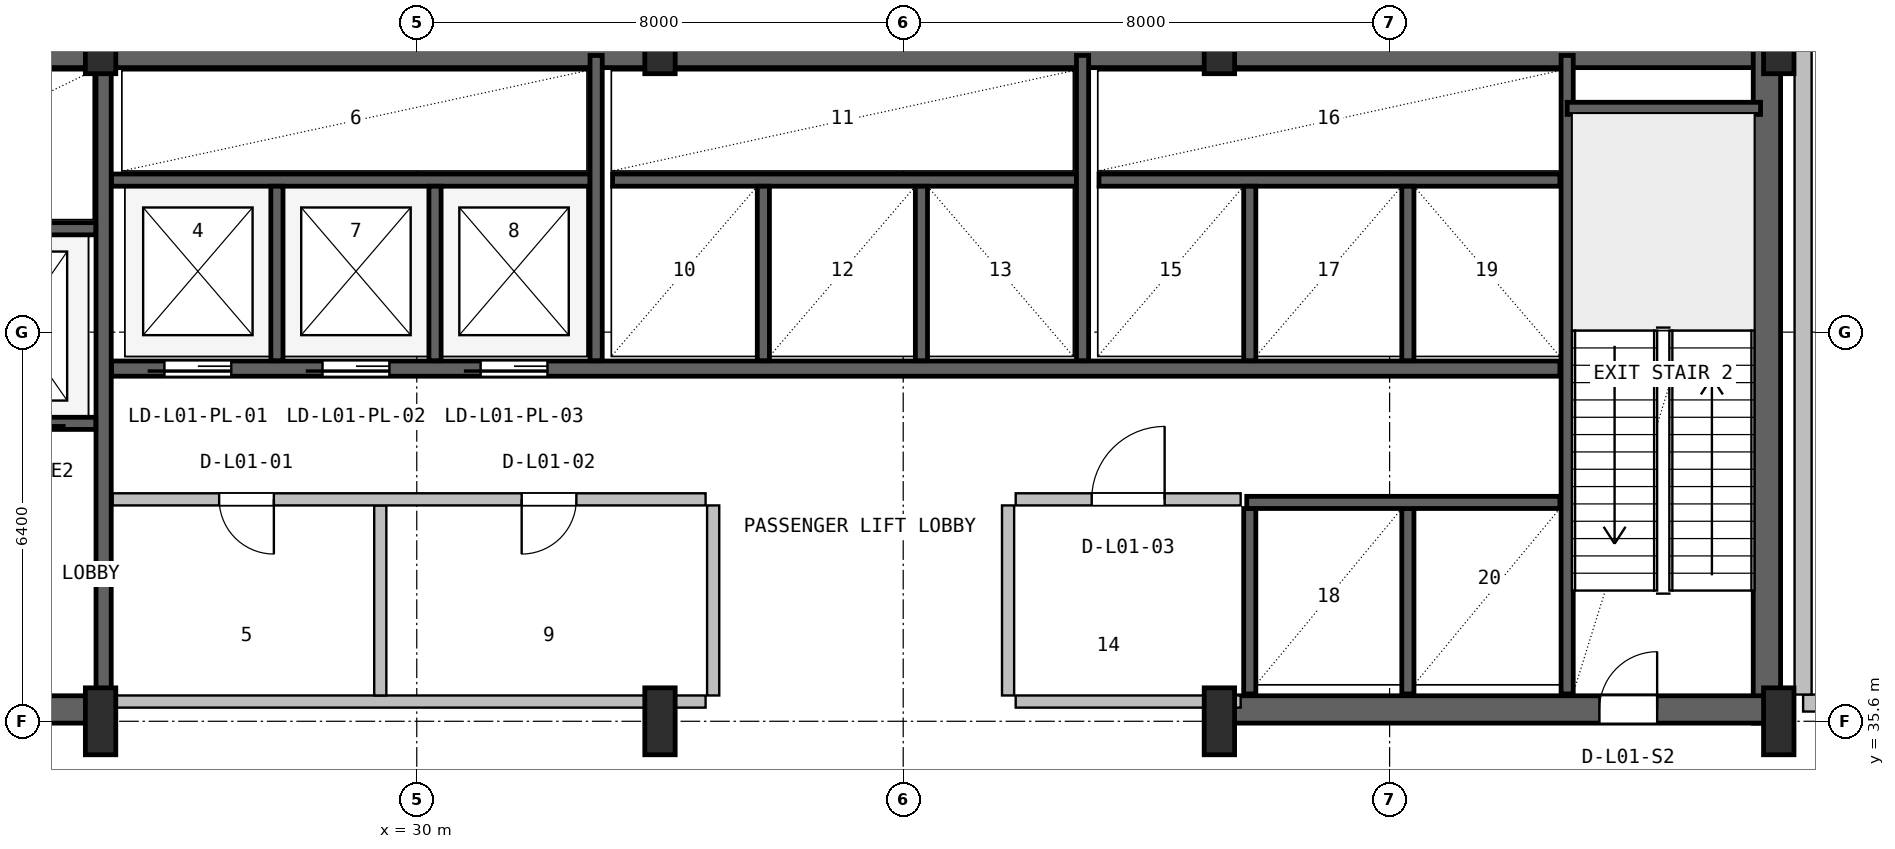
"""IFC4 building model, lengths in metres.
Left out: names, types, materials, properties, quantities, classifications, styles, units other than length and angle.
Written with IfcOpenShell. Run it as: python <this file> out.ifc"""

import sys

from ifc_helpers import new_model, si_unit, direction, frame, frame_2d, origin, origin_2d, place, context, subcontext, project, spatial, rectangle, i_section, extrude, source, transform, mapped, element, fill, save


model = new_model("IFC4")
c1 = context("Model", 3, precision=1e-05, world=origin(), true_north=direction((0.0, 1.0)))
c2 = subcontext(c1, "Body", "Model", "MODEL_VIEW")
j1 = project(units=[si_unit("LENGTHUNIT", "METRE"), si_unit("PLANEANGLEUNIT", "RADIAN")], contexts=[c1])
p1 = place(None, origin())
s1 = spatial("IfcSite", under=j1, at=p1, CompositionType="ELEMENT")
p2 = place(p1, origin())
s2 = spatial("IfcBuilding", under=s1, at=p2, CompositionType="ELEMENT")
p3 = place(p2, frame((0.0, 0.0, 6.0)))
s3 = spatial("IfcBuildingStorey", under=s2, at=p3, CompositionType="ELEMENT", Elevation=6.0)
p4 = place(p3, frame((15.6, 46.575, 0.0), z_axis=(0.0, 0.0, 1.0), x_axis=(1.0, 0.0, 0.0)))
e1 = element("IfcWall", 1, at=p4, inside=s3, PredefinedType="SHEAR", context=c2, shape_type="SweptSolid", body=[
    extrude(rectangle(XDim=36.8, YDim=0.45, at=frame_2d((18.4, 0.0))), origin(), (0.0, 0.0, 1.0), 5.12),
])
p5 = place(p3, frame((52.205, 35.57, 0.0), z_axis=(0.0, 0.0, 1.0), x_axis=(0.0, 1.0, 0.0)))
e2 = element("IfcWall", 2, at=p5, inside=s3, PredefinedType="SHEAR", context=c2, shape_type="SweptSolid", body=[
    extrude(rectangle(XDim=11.23, YDim=0.45, at=frame_2d((5.615, 0.0))), origin(), (0.0, 0.0, 1.0), 5.12),
])
p6 = place(p3, frame((15.57, 35.795, 0.0), z_axis=(0.0, 0.0, 1.0), x_axis=(1.0, 0.0, 0.0)))
e3 = element("IfcWall", 3, at=p6, inside=s3, PredefinedType="SHEAR", context=c2, shape_type="SweptSolid", body=[
    extrude(rectangle(XDim=9.23, YDim=0.45, at=frame_2d((4.615, 0.0))), origin(), (0.0, 0.0, 1.0), 5.12),
])
p7 = place(p6, frame((5.4, 0.0, 0.0)))
e4 = element("IfcOpeningElement", 4, at=p7, cuts=e3, PredefinedType="OPENING", context=c2, shape_type="SweptSolid", body=[
    extrude(rectangle(XDim=1.0, YDim=2.1, at=frame_2d((0.5, 1.05))), frame((0.0, 0.235, 0.0), z_axis=(0.0, -1.0, 0.0), x_axis=(1.0, 0.0, 0.0)), (0.0, 0.0, 1.0), 0.47),
])
p8 = place(p3, frame((43.2, 35.795, 0.0), z_axis=(0.0, 0.0, 1.0), x_axis=(1.0, 0.0, 0.0)))
e5 = element("IfcWall", 5, at=p8, inside=s3, PredefinedType="SHEAR", context=c2, shape_type="SweptSolid", body=[
    extrude(rectangle(XDim=9.23, YDim=0.45, at=frame_2d((4.615, 0.0))), origin(), (0.0, 0.0, 1.0), 5.12),
])
p9 = place(p8, frame((6.25, 0.0, 0.0)))
e6 = element("IfcOpeningElement", 6, at=p9, cuts=e5, PredefinedType="OPENING", context=c2, shape_type="SweptSolid", body=[
    extrude(rectangle(XDim=0.95, YDim=2.1, at=frame_2d((0.475, 1.05))), frame((0.0, 0.235, 0.0), z_axis=(0.0, -1.0, 0.0), x_axis=(1.0, 0.0, 0.0)), (0.0, 0.0, 1.0), 0.47),
])
m1 = source(origin(), c2, "Body", "SweptSolid", [
    extrude(i_section(OverallWidth=0.5, OverallDepth=1.1, WebThickness=0.018, FlangeThickness=0.032, FilletRadius=0.018, at=origin_2d()), origin(), (0.0, 0.0, 1.0), 5.4),
])
for number, where, z_axis, x_axis in (
    (7, (24.8, 35.6, 0.0), (0.0, 0.0, 1.0), (1.0, 0.0, 0.0)),
    (8, (24.8, 46.8, 0.0), (0.0, 0.0, 1.0), (1.0, 0.0, 0.0)),
    (9, (34.0, 35.6, 0.0), (0.0, 0.0, 1.0), (1.0, 0.0, 0.0)),
    (10, (34.0, 46.8, 0.0), (0.0, 0.0, 1.0), (1.0, 0.0, 0.0)),
    (11, (43.2, 35.6, 0.0), (0.0, 0.0, 1.0), (1.0, 0.0, 0.0)),
    (12, (43.2, 46.8, 0.0), (0.0, 0.0, 1.0), (1.0, 0.0, 0.0)),
    (13, (52.4, 35.6, 0.0), (0.0, 0.0, 1.0), (1.0, 0.0, 0.0)),
    (14, (52.4, 46.8, 0.0), (0.0, 0.0, 1.0), (1.0, 0.0, 0.0)),
):
    element("IfcColumn", number, at=place(p3, frame(where, z_axis=z_axis, x_axis=x_axis)), inside=s3, PredefinedType="COLUMN", context=c2, shape_type="MappedRepresentation", body=[
        mapped(m1, transform((0.0, 0.0, 0.0), x_axis=(1.0, 0.0, 0.0), y_axis=(0.0, 1.0, 0.0), z_axis=(0.0, 0.0, 1.0), scale=1.0)),
    ])
p10 = place(p3, frame((24.85, 36.05, 0.0), z_axis=(0.0, 0.0, 1.0), x_axis=(0.0, 1.0, 0.0)))
e15 = element("IfcWall", 15, at=p10, inside=s3, PredefinedType="SHEAR", context=c2, shape_type="SweptSolid", body=[
    extrude(rectangle(XDim=10.45, YDim=0.25, at=frame_2d((5.225, 0.0))), origin(), (0.0, 0.0, 1.0), 5.12),
])
p11 = place(p3, frame((19.2, 40.5, 0.0), z_axis=(0.0, 0.0, 1.0), x_axis=(1.0, 0.0, 0.0)))
e16 = element("IfcWall", 16, at=p11, inside=s3, PredefinedType="SHEAR", context=c2, shape_type="SweptSolid", body=[
    extrude(rectangle(XDim=5.52, YDim=0.2, at=frame_2d((2.76, 0.0))), origin(), (0.0, 0.0, 1.0), 5.12),
])
p12 = place(p11, frame((1.05, 0.0, 0.0)))
e17 = element("IfcOpeningElement", 17, at=p12, cuts=e16, PredefinedType="OPENING", context=c2, shape_type="SweptSolid", body=[
    extrude(rectangle(XDim=1.1, YDim=2.18, at=frame_2d((0.55, 1.09))), frame((0.0, 0.11, 0.0), z_axis=(0.0, -1.0, 0.0), x_axis=(1.0, 0.0, 0.0)), (0.0, 0.0, 1.0), 0.22),
])
p13 = place(p11, frame((3.65, 0.0, 0.0)))
e18 = element("IfcOpeningElement", 18, at=p13, cuts=e16, PredefinedType="OPENING", context=c2, shape_type="SweptSolid", body=[
    extrude(rectangle(XDim=1.1, YDim=2.18, at=frame_2d((0.55, 1.09))), frame((0.0, 0.11, 0.0), z_axis=(0.0, -1.0, 0.0), x_axis=(1.0, 0.0, 0.0)), (0.0, 0.0, 1.0), 0.22),
])
p14 = place(p3, frame((19.2, 43.7, 0.0), z_axis=(0.0, 0.0, 1.0), x_axis=(1.0, 0.0, 0.0)))
e19 = element("IfcWall", 19, at=p14, inside=s3, PredefinedType="SHEAR", context=c2, shape_type="SweptSolid", body=[
    extrude(rectangle(XDim=5.52, YDim=0.2, at=frame_2d((2.76, 0.0))), origin(), (0.0, 0.0, 1.0), 5.12),
])
p15 = place(p3, frame((48.92, 36.05, 0.0), z_axis=(0.0, 0.0, 1.0), x_axis=(0.0, 1.0, 0.0)))
e20 = element("IfcWall", 20, at=p15, inside=s3, PredefinedType="SHEAR", context=c2, shape_type="SweptSolid", body=[
    extrude(rectangle(XDim=10.5, YDim=0.2, at=frame_2d((5.25, 0.0))), origin(), (0.0, 0.0, 1.0), 5.12),
])
p16 = place(p3, frame((48.92, 45.68, 0.0), z_axis=(0.0, 0.0, 1.0), x_axis=(1.0, 0.0, 0.0)))
e21 = element("IfcWall", 21, at=p16, inside=s3, PredefinedType="SHEAR", context=c2, shape_type="SweptSolid", body=[
    extrude(rectangle(XDim=3.18, YDim=0.2, at=frame_2d((1.59, 0.0))), origin(), (0.0, 0.0, 1.0), 5.12),
])
p17 = place(p3, frame((24.98, 41.4, 0.0), z_axis=(0.0, 0.0, 1.0), x_axis=(1.0, 0.0, 0.0)))
e22 = element("IfcWall", 22, at=p17, inside=s3, PredefinedType="SHEAR", context=c2, shape_type="SweptSolid", body=[
    extrude(rectangle(XDim=23.82, YDim=0.25, at=frame_2d((11.91, 0.0))), origin(), (0.0, 0.0, 1.0), 5.12),
])
p18 = place(p17, frame((0.87, 0.0, 0.0)))
e23 = element("IfcOpeningElement", 23, at=p18, cuts=e22, PredefinedType="OPENING", context=c2, shape_type="SweptSolid", body=[
    extrude(rectangle(XDim=1.1, YDim=2.18, at=frame_2d((0.55, 1.09))), frame((0.0, 0.135, 0.0), z_axis=(0.0, -1.0, 0.0), x_axis=(1.0, 0.0, 0.0)), (0.0, 0.0, 1.0), 0.27),
])
p19 = place(p17, frame((3.47, 0.0, 0.0)))
e24 = element("IfcOpeningElement", 24, at=p19, cuts=e22, PredefinedType="OPENING", context=c2, shape_type="SweptSolid", body=[
    extrude(rectangle(XDim=1.1, YDim=2.18, at=frame_2d((0.55, 1.09))), frame((0.0, 0.135, 0.0), z_axis=(0.0, -1.0, 0.0), x_axis=(1.0, 0.0, 0.0)), (0.0, 0.0, 1.0), 0.27),
])
p20 = place(p17, frame((6.07, 0.0, 0.0)))
e25 = element("IfcOpeningElement", 25, at=p20, cuts=e22, PredefinedType="OPENING", context=c2, shape_type="SweptSolid", body=[
    extrude(rectangle(XDim=1.1, YDim=2.18, at=frame_2d((0.55, 1.09))), frame((0.0, 0.135, 0.0), z_axis=(0.0, -1.0, 0.0), x_axis=(1.0, 0.0, 0.0)), (0.0, 0.0, 1.0), 0.27),
])
p21 = place(p3, frame((24.98, 44.5, 0.0), z_axis=(0.0, 0.0, 1.0), x_axis=(1.0, 0.0, 0.0)))
e26 = element("IfcWall", 26, at=p21, inside=s3, PredefinedType="SHEAR", context=c2, shape_type="SweptSolid", body=[
    extrude(rectangle(XDim=7.87, YDim=0.2, at=frame_2d((3.935, 0.0))), origin(), (0.0, 0.0, 1.0), 5.12),
])
for number, where, z_axis, x_axis in (
    (27, (27.7, 41.53, 0.0), (0.0, 0.0, 1.0), (0.0, 1.0, 0.0)),
    (28, (30.3, 41.53, 0.0), (0.0, 0.0, 1.0), (0.0, 1.0, 0.0)),
):
    element("IfcWall", number, at=place(p3, frame(where, z_axis=z_axis, x_axis=x_axis)), inside=s3, PredefinedType="SHEAR", context=c2, shape_type="SweptSolid", body=[
        extrude(rectangle(XDim=2.87, YDim=0.2, at=frame_2d((1.435, 0.0))), origin(), (0.0, 0.0, 1.0), 5.12),
    ])
p22 = place(p3, frame((32.95, 41.53, 0.0), z_axis=(0.0, 0.0, 1.0), x_axis=(0.0, 1.0, 0.0)))
e29 = element("IfcWall", 29, at=p22, inside=s3, PredefinedType="SHEAR", context=c2, shape_type="SweptSolid", body=[
    extrude(rectangle(XDim=5.02, YDim=0.2, at=frame_2d((2.51, 0.0))), origin(), (0.0, 0.0, 1.0), 5.12),
])
p23 = place(p3, frame((33.22, 44.5, 0.0), z_axis=(0.0, 0.0, 1.0), x_axis=(1.0, 0.0, 0.0)))
e30 = element("IfcWall", 30, at=p23, inside=s3, PredefinedType="SHEAR", context=c2, shape_type="SweptSolid", body=[
    extrude(rectangle(XDim=7.63, YDim=0.2, at=frame_2d((3.815, 0.0))), origin(), (0.0, 0.0, 1.0), 5.12),
])
for number, where, z_axis, x_axis in (
    (31, (35.7, 41.53, 0.0), (0.0, 0.0, 1.0), (0.0, 1.0, 0.0)),
    (32, (38.3, 41.53, 0.0), (0.0, 0.0, 1.0), (0.0, 1.0, 0.0)),
):
    element("IfcWall", number, at=place(p3, frame(where, z_axis=z_axis, x_axis=x_axis)), inside=s3, PredefinedType="SHEAR", context=c2, shape_type="SweptSolid", body=[
        extrude(rectangle(XDim=2.87, YDim=0.2, at=frame_2d((1.435, 0.0))), origin(), (0.0, 0.0, 1.0), 5.12),
    ])
p24 = place(p3, frame((40.95, 41.53, 0.0), z_axis=(0.0, 0.0, 1.0), x_axis=(0.0, 1.0, 0.0)))
e33 = element("IfcWall", 33, at=p24, inside=s3, PredefinedType="SHEAR", context=c2, shape_type="SweptSolid", body=[
    extrude(rectangle(XDim=5.02, YDim=0.2, at=frame_2d((2.51, 0.0))), origin(), (0.0, 0.0, 1.0), 5.12),
])
p25 = place(p3, frame((41.22, 44.5, 0.0), z_axis=(0.0, 0.0, 1.0), x_axis=(1.0, 0.0, 0.0)))
e34 = element("IfcWall", 34, at=p25, inside=s3, PredefinedType="SHEAR", context=c2, shape_type="SweptSolid", body=[
    extrude(rectangle(XDim=7.58, YDim=0.2, at=frame_2d((3.79, 0.0))), origin(), (0.0, 0.0, 1.0), 5.12),
])
for number, where, z_axis, x_axis in (
    (35, (43.7, 41.53, 0.0), (0.0, 0.0, 1.0), (0.0, 1.0, 0.0)),
    (36, (46.3, 41.53, 0.0), (0.0, 0.0, 1.0), (0.0, 1.0, 0.0)),
):
    element("IfcWall", number, at=place(p3, frame(where, z_axis=z_axis, x_axis=x_axis)), inside=s3, PredefinedType="SHEAR", context=c2, shape_type="SweptSolid", body=[
        extrude(rectangle(XDim=2.87, YDim=0.2, at=frame_2d((1.435, 0.0))), origin(), (0.0, 0.0, 1.0), 5.12),
    ])
for number, where, z_axis, x_axis in (
    (37, (43.7, 36.05, 0.0), (0.0, 0.0, 1.0), (0.0, 1.0, 0.0)),
    (38, (46.3, 36.05, 0.0), (0.0, 0.0, 1.0), (0.0, 1.0, 0.0)),
):
    element("IfcWall", number, at=place(p3, frame(where, z_axis=z_axis, x_axis=x_axis)), inside=s3, PredefinedType="SHEAR", context=c2, shape_type="SweptSolid", body=[
        extrude(rectangle(XDim=3.05, YDim=0.2, at=frame_2d((1.525, 0.0))), origin(), (0.0, 0.0, 1.0), 5.12),
    ])
p26 = place(p3, frame((43.65, 39.2, 0.0), z_axis=(0.0, 0.0, 1.0), x_axis=(1.0, 0.0, 0.0)))
e39 = element("IfcWall", 39, at=p26, inside=s3, PredefinedType="SHEAR", context=c2, shape_type="SweptSolid", body=[
    extrude(rectangle(XDim=5.15, YDim=0.2, at=frame_2d((2.575, 0.0))), origin(), (0.0, 0.0, 1.0), 5.12),
])
p27 = place(p3, frame((25.0, 35.925, 0.0), z_axis=(0.0, 0.0, 1.0), x_axis=(1.0, 0.0, 0.0)))
e40 = element("IfcWall", 40, at=p27, inside=s3, PredefinedType="PLUMBINGWALL", context=c2, shape_type="SweptSolid", body=[
    extrude(rectangle(XDim=9.75, YDim=0.2, at=frame_2d((4.875, 0.0))), origin(), (0.0, 0.0, 1.0), 4.183),
])
p28 = place(p3, frame((29.4, 36.025, 0.0), z_axis=(0.0, 0.0, 1.0), x_axis=(0.0, 1.0, 0.0)))
e41 = element("IfcWall", 41, at=p28, inside=s3, PredefinedType="PLUMBINGWALL", context=c2, shape_type="SweptSolid", body=[
    extrude(rectangle(XDim=3.125, YDim=0.2, at=frame_2d((1.562, 0.0))), origin(), (0.0, 0.0, 1.0), 5.1),
])
p29 = place(p3, frame((25.0, 39.25, 0.0), z_axis=(0.0, 0.0, 1.0), x_axis=(1.0, 0.0, 0.0)))
e42 = element("IfcWall", 42, at=p29, inside=s3, PredefinedType="PLUMBINGWALL", context=c2, shape_type="SweptSolid", body=[
    extrude(rectangle(XDim=9.75, YDim=0.2, at=frame_2d((4.875, 0.0))), origin(), (0.0, 0.0, 1.0), 5.1),
])
p30 = place(p29, frame((1.75, 0.0, 0.0)))
e43 = element("IfcOpeningElement", 43, at=p30, cuts=e42, PredefinedType="OPENING", context=c2, shape_type="SweptSolid", body=[
    extrude(rectangle(XDim=0.9, YDim=2.06, at=frame_2d((0.45, 1.03))), frame((0.0, 0.11, 0.0), z_axis=(0.0, -1.0, 0.0), x_axis=(1.0, 0.0, 0.0)), (0.0, 0.0, 1.0), 0.22),
])
p31 = place(p29, frame((6.725, 0.0, 0.0)))
e44 = element("IfcOpeningElement", 44, at=p31, cuts=e42, PredefinedType="OPENING", context=c2, shape_type="SweptSolid", body=[
    extrude(rectangle(XDim=0.9, YDim=2.06, at=frame_2d((0.45, 1.03))), frame((0.0, 0.11, 0.0), z_axis=(0.0, -1.0, 0.0), x_axis=(1.0, 0.0, 0.0)), (0.0, 0.0, 1.0), 0.22),
])
p32 = place(p3, frame((34.875, 36.025, 0.0), z_axis=(0.0, 0.0, 1.0), x_axis=(0.0, 1.0, 0.0)))
e45 = element("IfcWall", 45, at=p32, inside=s3, PredefinedType="PLUMBINGWALL", context=c2, shape_type="SweptSolid", body=[
    extrude(rectangle(XDim=3.125, YDim=0.2, at=frame_2d((1.562, 0.0))), origin(), (0.0, 0.0, 1.0), 5.1),
])
p33 = place(p3, frame((39.85, 35.925, 0.0), z_axis=(0.0, 0.0, 1.0), x_axis=(1.0, 0.0, 0.0)))
e46 = element("IfcWall", 46, at=p33, inside=s3, PredefinedType="SOLIDWALL", context=c2, shape_type="SweptSolid", body=[
    extrude(rectangle(XDim=3.7, YDim=0.2, at=frame_2d((1.85, 0.0))), origin(), (0.0, 0.0, 1.0), 4.183),
])
p34 = place(p3, frame((39.85, 39.25, 0.0), z_axis=(0.0, 0.0, 1.0), x_axis=(1.0, 0.0, 0.0)))
e47 = element("IfcWall", 47, at=p34, inside=s3, PredefinedType="SOLIDWALL", context=c2, shape_type="SweptSolid", body=[
    extrude(rectangle(XDim=3.7, YDim=0.2, at=frame_2d((1.85, 0.0))), origin(), (0.0, 0.0, 1.0), 5.1),
])
p35 = place(p34, frame((1.25, 0.0, 0.0)))
e48 = element("IfcOpeningElement", 48, at=p35, cuts=e47, PredefinedType="OPENING", context=c2, shape_type="SweptSolid", body=[
    extrude(rectangle(XDim=1.2, YDim=2.1, at=frame_2d((0.6, 1.05))), frame((0.0, 0.11, 0.0), z_axis=(0.0, -1.0, 0.0), x_axis=(1.0, 0.0, 0.0)), (0.0, 0.0, 1.0), 0.22),
])
p36 = place(p3, frame((39.725, 36.025, 0.0), z_axis=(0.0, 0.0, 1.0), x_axis=(0.0, 1.0, 0.0)))
e49 = element("IfcWall", 49, at=p36, inside=s3, PredefinedType="SOLIDWALL", context=c2, shape_type="SweptSolid", body=[
    extrude(rectangle(XDim=3.125, YDim=0.2, at=frame_2d((1.562, 0.0))), origin(), (0.0, 0.0, 1.0), 5.1),
])
p37 = place(p3, frame((52.8, 35.9, 0.0), z_axis=(0.0, 0.0, 1.0), x_axis=(1.0, 0.0, 0.0)))
e50 = element("IfcWall", 50, at=p37, inside=s3, PredefinedType="SOLIDWALL", context=c2, shape_type="SweptSolid", body=[
    extrude(rectangle(XDim=12.5, YDim=0.28, at=frame_2d((6.25, 0.0))), origin(), (0.0, 0.0, 1.0), 4.183),
])
p38 = place(p37, frame((5.35, 0.0, 0.0)))
e51 = element("IfcOpeningElement", 51, at=p38, cuts=e50, PredefinedType="OPENING", context=c2, shape_type="SweptSolid", body=[
    extrude(rectangle(XDim=1.8, YDim=2.25, at=frame_2d((0.9, 1.125))), frame((0.0, 0.15, 0.0), z_axis=(0.0, -1.0, 0.0), x_axis=(1.0, 0.0, 0.0)), (0.0, 0.0, 1.0), 0.3),
])
p39 = place(p37, frame((7.9, 0.0, 0.95)))
e52 = element("IfcOpeningElement", 52, at=p39, cuts=e50, PredefinedType="OPENING", context=c2, shape_type="SweptSolid", body=[
    extrude(rectangle(XDim=2.2, YDim=1.3, at=frame_2d((1.1, 0.65))), frame((0.0, 0.15, 0.0), z_axis=(0.0, -1.0, 0.0), x_axis=(1.0, 0.0, 0.0)), (0.0, 0.0, 1.0), 0.3),
])
p40 = place(p3, frame((52.8, 36.04, 0.0), z_axis=(0.0, 0.0, 1.0), x_axis=(0.0, 1.0, 0.0)))
e53 = element("IfcWall", 53, at=p40, inside=s3, PredefinedType="SOLIDWALL", context=c2, shape_type="SweptSolid", body=[
    extrude(rectangle(XDim=11.65, YDim=0.28, at=frame_2d((5.825, 0.0))), origin(), (0.0, 0.0, 1.0), 4.183),
])
m2 = source(origin(), c2, "Body", "SweptSolid", [
    extrude(rectangle(XDim=0.95, YDim=2.1, at=frame_2d((0.475, 1.05))), frame((0.0, 0.025, 0.0), z_axis=(0.0, -1.0, 0.0), x_axis=(1.0, 0.0, 0.0)), (0.0, 0.0, 1.0), 0.05),
])
p41 = place(p9, origin())
e54 = element("IfcDoor", 54, at=p41, inside=s3, OperationType="SINGLE_SWING_RIGHT", PredefinedType="DOOR", context=c2, shape_type="MappedRepresentation", body=[
    mapped(m2, transform((0.0, 0.0, 0.0), x_axis=(1.0, 0.0, 0.0), y_axis=(0.0, 1.0, 0.0), z_axis=(0.0, 0.0, 1.0), scale=1.0)),
])
fill(e6, e54)
m3 = source(origin(), c2, "Body", "SweptSolid", [
    extrude(rectangle(XDim=1.1, YDim=2.18, at=frame_2d((0.55, 1.09))), frame((0.0, 0.025, 0.0), z_axis=(0.0, -1.0, 0.0), x_axis=(1.0, 0.0, 0.0)), (0.0, 0.0, 1.0), 0.05),
])
p42 = place(p18, frame((1.1, 0.0, 0.0), z_axis=(0.0, 0.0, 1.0), x_axis=(-1.0, 0.0, 0.0)))
e55 = element("IfcDoor", 55, at=p42, inside=s3, OperationType="SLIDING_TO_LEFT", PredefinedType="DOOR", context=c2, shape_type="MappedRepresentation", body=[
    mapped(m3, transform((0.0, 0.0, 0.0), x_axis=(1.0, 0.0, 0.0), y_axis=(0.0, 1.0, 0.0), z_axis=(0.0, 0.0, 1.0), scale=1.0)),
])
fill(e23, e55)
p43 = place(p19, frame((1.1, 0.0, 0.0), z_axis=(0.0, 0.0, 1.0), x_axis=(-1.0, 0.0, 0.0)))
e56 = element("IfcDoor", 56, at=p43, inside=s3, OperationType="SLIDING_TO_LEFT", PredefinedType="DOOR", context=c2, shape_type="MappedRepresentation", body=[
    mapped(m3, transform((0.0, 0.0, 0.0), x_axis=(1.0, 0.0, 0.0), y_axis=(0.0, 1.0, 0.0), z_axis=(0.0, 0.0, 1.0), scale=1.0)),
])
fill(e24, e56)
p44 = place(p20, frame((1.1, 0.0, 0.0), z_axis=(0.0, 0.0, 1.0), x_axis=(-1.0, 0.0, 0.0)))
e57 = element("IfcDoor", 57, at=p44, inside=s3, OperationType="SLIDING_TO_LEFT", PredefinedType="DOOR", context=c2, shape_type="MappedRepresentation", body=[
    mapped(m3, transform((0.0, 0.0, 0.0), x_axis=(1.0, 0.0, 0.0), y_axis=(0.0, 1.0, 0.0), z_axis=(0.0, 0.0, 1.0), scale=1.0)),
])
fill(e25, e57)
m4 = source(origin(), c2, "Body", "SweptSolid", [
    extrude(rectangle(XDim=0.9, YDim=2.06, at=frame_2d((0.45, 1.03))), frame((0.0, 0.025, 0.0), z_axis=(0.0, -1.0, 0.0), x_axis=(1.0, 0.0, 0.0)), (0.0, 0.0, 1.0), 0.05),
])
p45 = place(p30, frame((0.9, 0.0, 0.0), z_axis=(0.0, 0.0, 1.0), x_axis=(-1.0, 0.0, 0.0)))
e58 = element("IfcDoor", 58, at=p45, inside=s3, OperationType="SINGLE_SWING_RIGHT", PredefinedType="DOOR", context=c2, shape_type="MappedRepresentation", body=[
    mapped(m4, transform((0.0, 0.0, 0.0), x_axis=(1.0, 0.0, 0.0), y_axis=(0.0, 1.0, 0.0), z_axis=(0.0, 0.0, 1.0), scale=1.0)),
])
fill(e43, e58)
p46 = place(p31, frame((0.9, 0.0, 0.0), z_axis=(0.0, 0.0, 1.0), x_axis=(-1.0, 0.0, 0.0)))
e59 = element("IfcDoor", 59, at=p46, inside=s3, OperationType="SINGLE_SWING_LEFT", PredefinedType="DOOR", context=c2, shape_type="MappedRepresentation", body=[
    mapped(m4, transform((0.0, 0.0, 0.0), x_axis=(1.0, 0.0, 0.0), y_axis=(0.0, 1.0, 0.0), z_axis=(0.0, 0.0, 1.0), scale=1.0)),
])
fill(e44, e59)
m5 = source(origin(), c2, "Body", "SweptSolid", [
    extrude(rectangle(XDim=1.2, YDim=2.1, at=frame_2d((0.6, 1.05))), frame((0.0, 0.025, 0.0), z_axis=(0.0, -1.0, 0.0), x_axis=(1.0, 0.0, 0.0)), (0.0, 0.0, 1.0), 0.05),
])
p47 = place(p35, origin())
e60 = element("IfcDoor", 60, at=p47, inside=s3, OperationType="SINGLE_SWING_RIGHT", PredefinedType="DOOR", context=c2, shape_type="MappedRepresentation", body=[
    mapped(m5, transform((0.0, 0.0, 0.0), x_axis=(1.0, 0.0, 0.0), y_axis=(0.0, 1.0, 0.0), z_axis=(0.0, 0.0, 1.0), scale=1.0)),
])
fill(e48, e60)
save(model, sys.argv[1])
